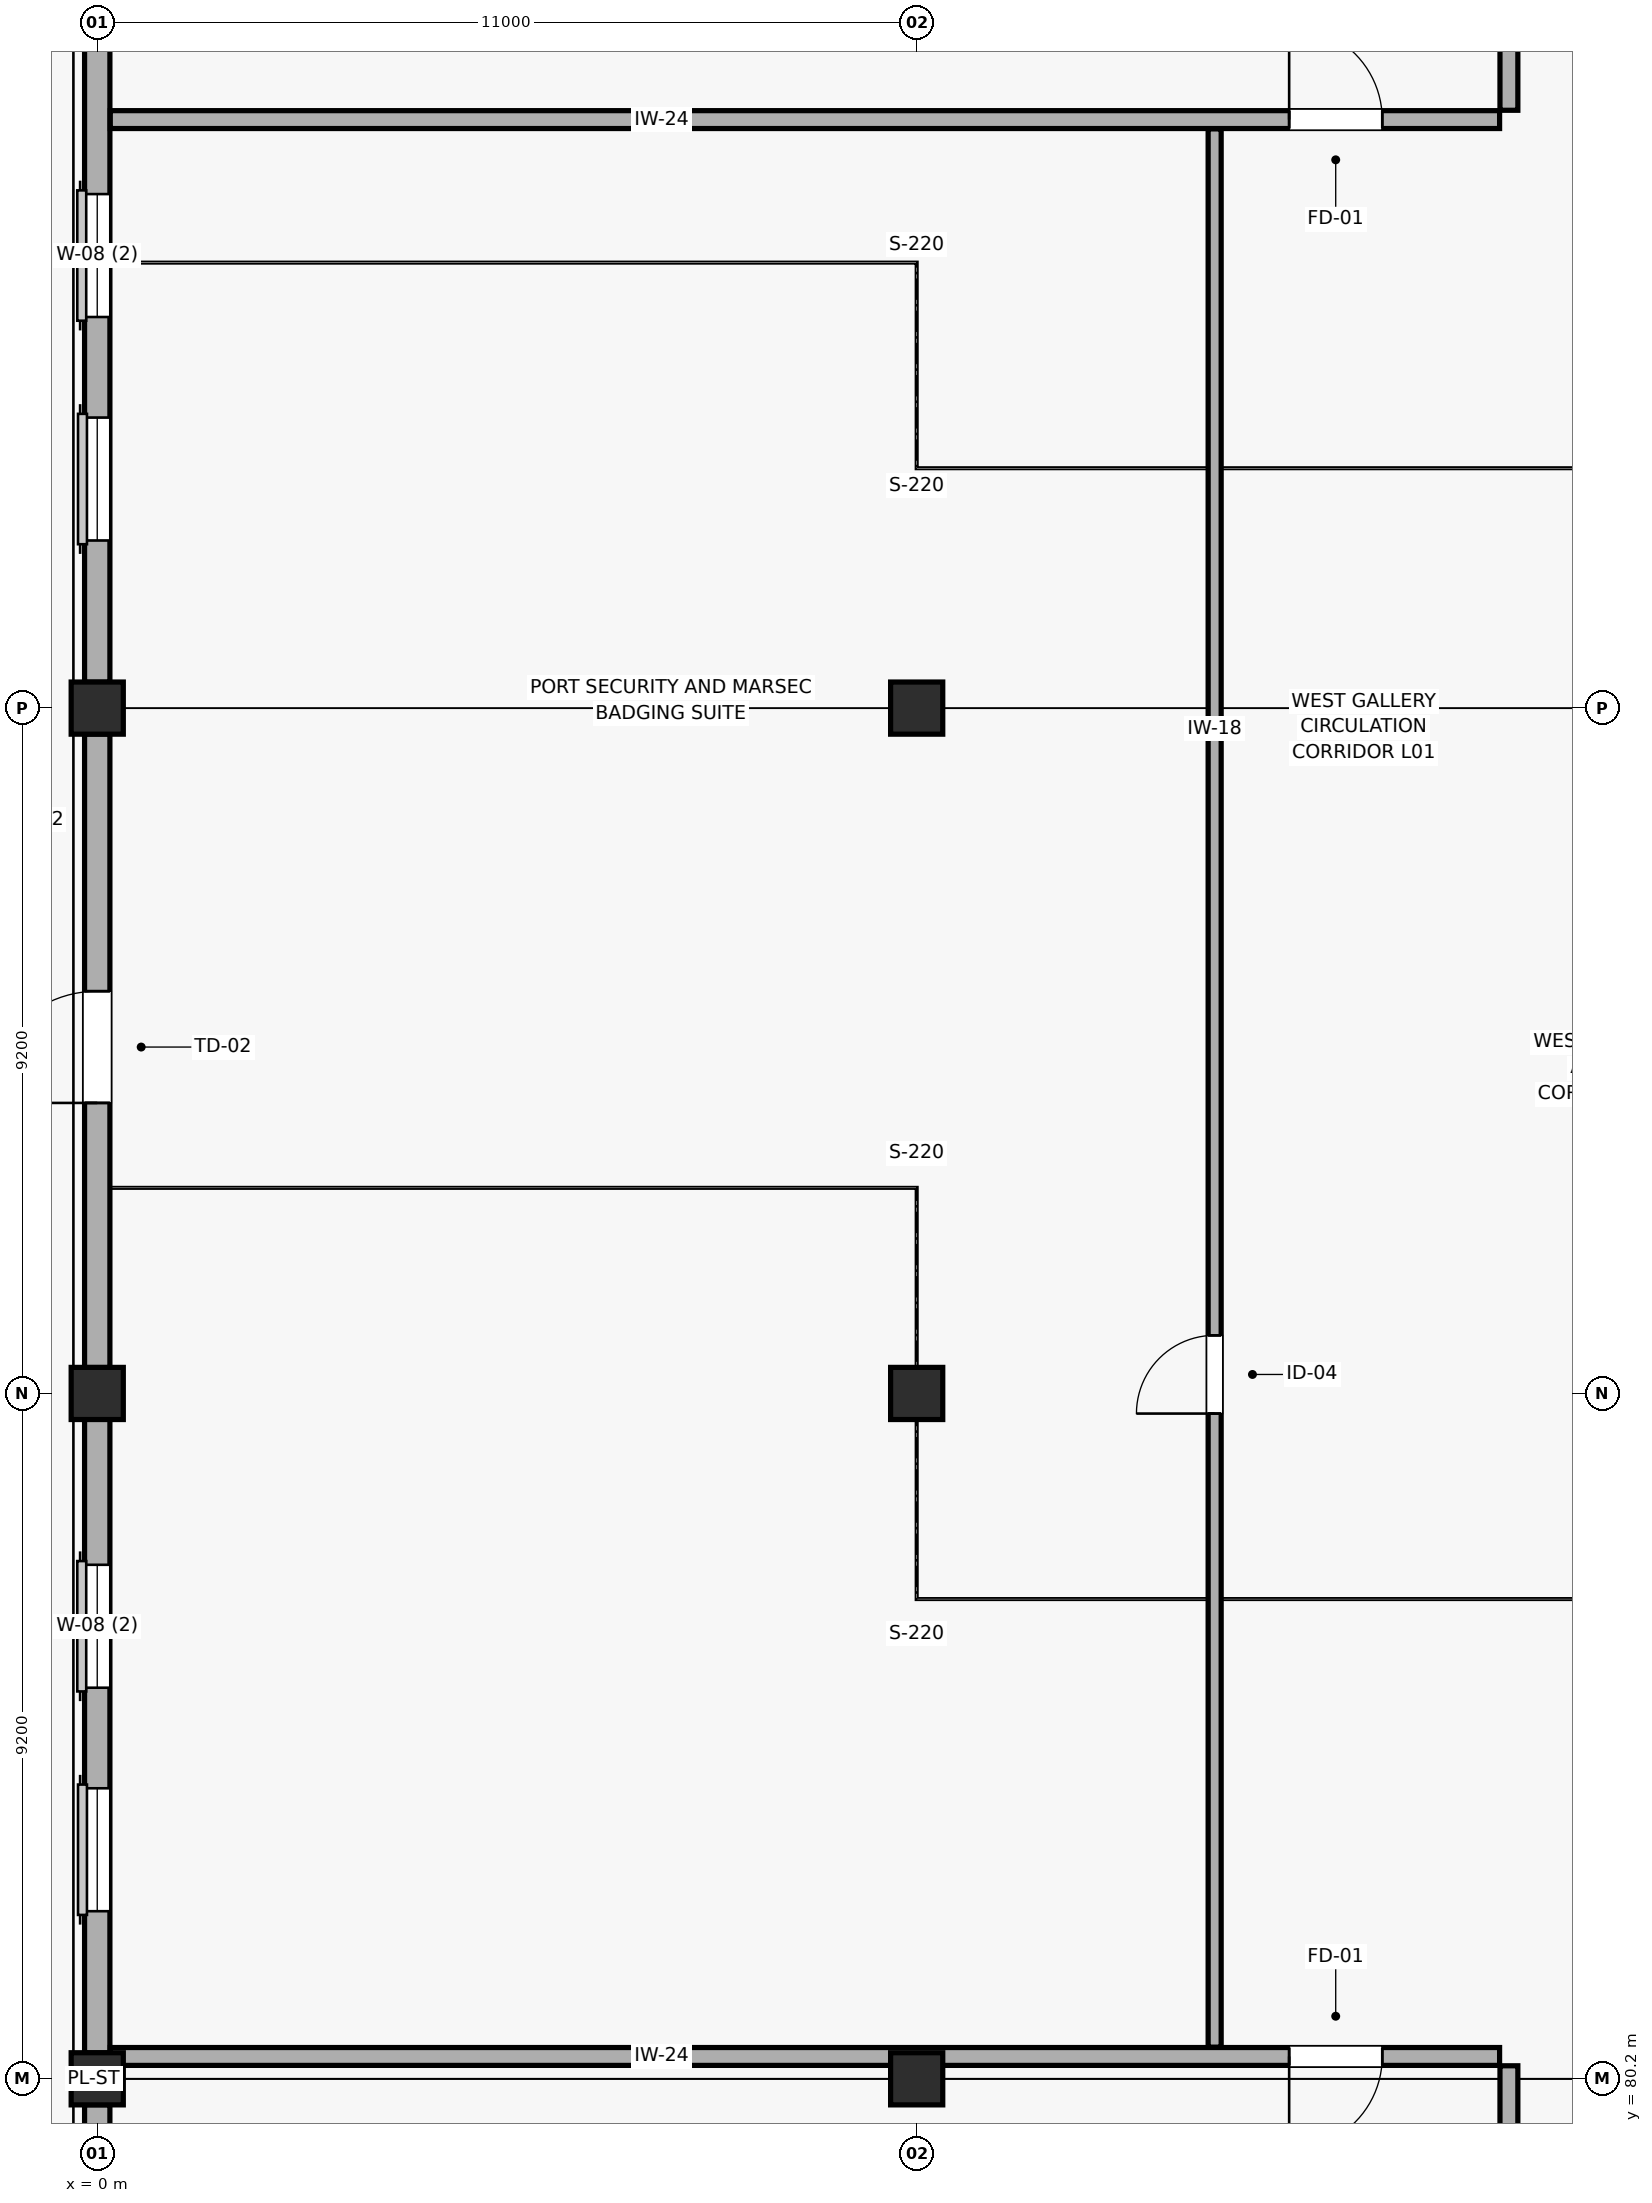
"""IFC4 building model, lengths in metres.
Left out: names, types, materials, properties, quantities, classifications, styles, units other than length and angle.
Written with IfcOpenShell. Run it as: python <this file> out.ifc"""

import sys

from ifc_helpers import new_model, si_unit, direction, frame, frame_2d, origin, origin_2d, place, context, subcontext, project, spatial, rectangle, extrude, element, fill, save


model = new_model("IFC4")
c1 = context("Model", 3, precision=1e-05, world=origin(), true_north=direction((0.0, 1.0)))
c2 = subcontext(c1, "Body", "Model", "MODEL_VIEW")
j1 = project(units=[si_unit("LENGTHUNIT", "METRE"), si_unit("PLANEANGLEUNIT", "RADIAN")], contexts=[c1])
p1 = place(None, origin())
s1 = spatial("IfcSite", under=j1, at=p1, CompositionType="ELEMENT")
p2 = place(p1, origin())
s2 = spatial("IfcBuilding", under=s1, at=p2, CompositionType="ELEMENT")
p3 = place(p2, frame((0.0, 0.0, 5.4)))
s3 = spatial("IfcBuildingStorey", under=s2, at=p3, CompositionType="ELEMENT", Elevation=5.4)
for number, where, z_axis, x_axis in (
    (1, (0.0, 80.2, 0.0), (0.0, 0.0, 1.0), (1.0, 0.0, 0.0)),
    (2, (0.0, 89.4, 0.0), (0.0, 0.0, 1.0), (1.0, 0.0, 0.0)),
    (3, (0.0, 98.6, 0.0), (0.0, 0.0, 1.0), (1.0, 0.0, 0.0)),
    (4, (11.0, 80.2, 0.0), (0.0, 0.0, 1.0), (1.0, 0.0, 0.0)),
    (5, (11.0, 89.4, 0.0), (0.0, 0.0, 1.0), (1.0, 0.0, 0.0)),
    (6, (11.0, 98.6, 0.0), (0.0, 0.0, 1.0), (1.0, 0.0, 0.0)),
):
    element("IfcColumn", number, at=place(p3, frame(where, z_axis=z_axis, x_axis=x_axis)), inside=s3, PredefinedType="COLUMN", context=c2, shape_type="SweptSolid", body=[
        extrude(rectangle(XDim=0.7, YDim=0.7, at=origin_2d()), origin(), (0.0, 0.0, 1.0), 4.5),
    ])
p4 = place(p3, frame((0.0, 79.852, 0.0), z_axis=(0.0, 0.0, 1.0), x_axis=(0.0, -1.0, 0.0)))
e7 = element("IfcWall", 7, at=p4, inside=s3, PredefinedType="SOLIDWALL", context=c2, shape_type="SweptSolid", body=[
    extrude(rectangle(XDim=7.904, YDim=0.34, at=frame_2d((3.952, 0.0))), origin(), (0.0, 0.0, 1.0), 3.725),
])
p5 = place(p4, frame((1.952, 0.0, 0.95)))
e8 = element("IfcOpeningElement", 8, at=p5, cuts=e7, PredefinedType="OPENING", context=c2, shape_type="SweptSolid", body=[
    extrude(rectangle(XDim=1.5, YDim=2.25, at=frame_2d((0.75, 1.125))), frame((0.0, 0.18, 0.0), z_axis=(0.0, -1.0, 0.0), x_axis=(1.0, 0.0, 0.0)), (0.0, 0.0, 1.0), 0.36),
])
p6 = place(p4, frame((4.952, 0.0, 0.95)))
e9 = element("IfcOpeningElement", 9, at=p6, cuts=e7, PredefinedType="OPENING", context=c2, shape_type="SweptSolid", body=[
    extrude(rectangle(XDim=1.5, YDim=2.25, at=frame_2d((0.75, 1.125))), frame((0.0, 0.18, 0.0), z_axis=(0.0, -1.0, 0.0), x_axis=(1.0, 0.0, 0.0)), (0.0, 0.0, 1.0), 0.36),
])
p7 = place(p3, frame((0.0, 89.052, 0.0), z_axis=(0.0, 0.0, 1.0), x_axis=(0.0, -1.0, 0.0)))
e10 = element("IfcWall", 10, at=p7, inside=s3, PredefinedType="SOLIDWALL", context=c2, shape_type="SweptSolid", body=[
    extrude(rectangle(XDim=8.504, YDim=0.34, at=frame_2d((4.252, 0.0))), origin(), (0.0, 0.0, 1.0), 3.725),
])
p8 = place(p7, frame((1.952, 0.0, 0.95)))
e11 = element("IfcOpeningElement", 11, at=p8, cuts=e10, PredefinedType="OPENING", context=c2, shape_type="SweptSolid", body=[
    extrude(rectangle(XDim=1.65, YDim=2.25, at=frame_2d((0.825, 1.125))), frame((0.0, 0.18, 0.0), z_axis=(0.0, -1.0, 0.0), x_axis=(1.0, 0.0, 0.0)), (0.0, 0.0, 1.0), 0.36),
])
p9 = place(p7, frame((4.952, 0.0, 0.95)))
e12 = element("IfcOpeningElement", 12, at=p9, cuts=e10, PredefinedType="OPENING", context=c2, shape_type="SweptSolid", body=[
    extrude(rectangle(XDim=1.65, YDim=2.25, at=frame_2d((0.825, 1.125))), frame((0.0, 0.18, 0.0), z_axis=(0.0, -1.0, 0.0), x_axis=(1.0, 0.0, 0.0)), (0.0, 0.0, 1.0), 0.36),
])
p10 = place(p3, frame((0.0, 98.252, 0.0), z_axis=(0.0, 0.0, 1.0), x_axis=(0.0, -1.0, 0.0)))
e13 = element("IfcWall", 13, at=p10, inside=s3, PredefinedType="SOLIDWALL", context=c2, shape_type="SweptSolid", body=[
    extrude(rectangle(XDim=8.504, YDim=0.34, at=frame_2d((4.252, 0.0))), origin(), (0.0, 0.0, 1.0), 3.725),
])
p11 = place(p10, frame((3.452, 0.0, 0.0)))
e14 = element("IfcOpeningElement", 14, at=p11, cuts=e13, PredefinedType="OPENING", context=c2, shape_type="SweptSolid", body=[
    extrude(rectangle(XDim=1.5, YDim=2.25, at=frame_2d((0.75, 1.125))), frame((0.0, 0.18, 0.0), z_axis=(0.0, -1.0, 0.0), x_axis=(1.0, 0.0, 0.0)), (0.0, 0.0, 1.0), 0.36),
])
p12 = place(p3, frame((0.0, 107.452, 0.0), z_axis=(0.0, 0.0, 1.0), x_axis=(0.0, -1.0, 0.0)))
e15 = element("IfcWall", 15, at=p12, inside=s3, PredefinedType="SOLIDWALL", context=c2, shape_type="SweptSolid", body=[
    extrude(rectangle(XDim=8.504, YDim=0.34, at=frame_2d((4.252, 0.0))), origin(), (0.0, 0.0, 1.0), 3.725),
])
p13 = place(p12, frame((1.952, 0.0, 0.95)))
e16 = element("IfcOpeningElement", 16, at=p13, cuts=e15, PredefinedType="OPENING", context=c2, shape_type="SweptSolid", body=[
    extrude(rectangle(XDim=1.65, YDim=2.25, at=frame_2d((0.825, 1.125))), frame((0.0, 0.18, 0.0), z_axis=(0.0, -1.0, 0.0), x_axis=(1.0, 0.0, 0.0)), (0.0, 0.0, 1.0), 0.36),
])
p14 = place(p12, frame((4.952, 0.0, 0.95)))
e17 = element("IfcOpeningElement", 17, at=p14, cuts=e15, PredefinedType="OPENING", context=c2, shape_type="SweptSolid", body=[
    extrude(rectangle(XDim=1.65, YDim=2.25, at=frame_2d((0.825, 1.125))), frame((0.0, 0.18, 0.0), z_axis=(0.0, -1.0, 0.0), x_axis=(1.0, 0.0, 0.0)), (0.0, 0.0, 1.0), 0.36),
])
p15 = place(p3, frame((0.175, 106.5, 0.0), z_axis=(0.0, 0.0, 1.0), x_axis=(1.0, 0.0, 0.0)))
e18 = element("IfcWall", 18, at=p15, inside=s3, PredefinedType="PARTITIONING", context=c2, shape_type="SweptSolid", body=[
    extrude(rectangle(XDim=18.65, YDim=0.24, at=frame_2d((9.325, 0.0))), origin(), (0.0, 0.0, 1.0), 3.725),
])
p16 = place(p15, frame((15.825, 0.0, 0.0)))
e19 = element("IfcOpeningElement", 19, at=p16, cuts=e18, PredefinedType="OPENING", context=c2, shape_type="SweptSolid", body=[
    extrude(rectangle(XDim=1.25, YDim=2.2, at=frame_2d((0.625, 1.1))), frame((0.0, 0.13, 0.0), z_axis=(0.0, -1.0, 0.0), x_axis=(1.0, 0.0, 0.0)), (0.0, 0.0, 1.0), 0.26),
])
p17 = place(p3, frame((0.175, 80.5, 0.0), z_axis=(0.0, 0.0, 1.0), x_axis=(1.0, 0.0, 0.0)))
e20 = element("IfcWall", 20, at=p17, inside=s3, PredefinedType="PARTITIONING", context=c2, shape_type="SweptSolid", body=[
    extrude(rectangle(XDim=18.65, YDim=0.24, at=frame_2d((9.325, 0.0))), origin(), (0.0, 0.0, 1.0), 3.625),
])
p18 = place(p17, frame((15.825, 0.0, 0.0)))
e21 = element("IfcOpeningElement", 21, at=p18, cuts=e20, PredefinedType="OPENING", context=c2, shape_type="SweptSolid", body=[
    extrude(rectangle(XDim=1.25, YDim=2.2, at=frame_2d((0.625, 1.1))), frame((0.0, 0.13, 0.0), z_axis=(0.0, -1.0, 0.0), x_axis=(1.0, 0.0, 0.0)), (0.0, 0.0, 1.0), 0.26),
])
p19 = place(p3, frame((15.0, 80.625, 0.0), z_axis=(0.0, 0.0, 1.0), x_axis=(0.0, 1.0, 0.0)))
e22 = element("IfcWall", 22, at=p19, inside=s3, PredefinedType="PARTITIONING", context=c2, shape_type="SweptSolid", body=[
    extrude(rectangle(XDim=25.75, YDim=0.175, at=frame_2d((12.875, 0.0))), origin(), (0.0, 0.0, 1.0), 3.625),
])
p20 = place(p19, frame((8.505, 0.0, 0.0)))
e23 = element("IfcOpeningElement", 23, at=p20, cuts=e22, PredefinedType="OPENING", context=c2, shape_type="SweptSolid", body=[
    extrude(rectangle(XDim=1.05, YDim=2.2, at=frame_2d((0.525, 1.1))), frame((0.0, 0.097, 0.0), z_axis=(0.0, -1.0, 0.0), x_axis=(1.0, 0.0, 0.0)), (0.0, 0.0, 1.0), 0.195),
])
p21 = place(p3, frame((18.95, 106.625, 0.0), z_axis=(0.0, 0.0, 1.0), x_axis=(0.0, 1.0, 0.0)))
e24 = element("IfcWall", 24, at=p21, inside=s3, PredefinedType="PARTITIONING", context=c2, shape_type="SweptSolid", body=[
    extrude(rectangle(XDim=3.525, YDim=0.24, at=frame_2d((1.762, 0.0))), origin(), (0.0, 0.0, 1.0), 3.625),
])
p22 = place(p21, frame((1.055, 0.0, 0.0)))
e25 = element("IfcOpeningElement", 25, at=p22, cuts=e24, PredefinedType="OPENING", context=c2, shape_type="SweptSolid", body=[
    extrude(rectangle(XDim=1.25, YDim=2.2, at=frame_2d((0.625, 1.1))), frame((0.0, 0.13, 0.0), z_axis=(0.0, -1.0, 0.0), x_axis=(1.0, 0.0, 0.0)), (0.0, 0.0, 1.0), 0.26),
])
p23 = place(p3, frame((18.95, 76.85, 0.0), z_axis=(0.0, 0.0, 1.0), x_axis=(0.0, 1.0, 0.0)))
e26 = element("IfcWall", 26, at=p23, inside=s3, PredefinedType="PARTITIONING", context=c2, shape_type="SweptSolid", body=[
    extrude(rectangle(XDim=3.525, YDim=0.24, at=frame_2d((1.762, 0.0))), origin(), (0.0, 0.0, 1.0), 3.625),
])
p24 = place(p23, frame((1.05, 0.0, 0.0)))
e27 = element("IfcOpeningElement", 27, at=p24, cuts=e26, PredefinedType="OPENING", context=c2, shape_type="SweptSolid", body=[
    extrude(rectangle(XDim=1.25, YDim=2.2, at=frame_2d((0.625, 1.1))), frame((0.0, 0.13, 0.0), z_axis=(0.0, -1.0, 0.0), x_axis=(1.0, 0.0, 0.0)), (0.0, 0.0, 1.0), 0.26),
])
p25 = place(p8, origin())
e28 = element("IfcWindow", 28, at=p25, inside=s3, PartitioningType="SINGLE_PANEL", PredefinedType="WINDOW", context=c2, shape_type="SweptSolid", body=[
    extrude(rectangle(XDim=1.65, YDim=2.25, at=frame_2d((0.825, 1.125))), frame((0.0, 0.03, 0.0), z_axis=(0.0, -1.0, 0.0), x_axis=(1.0, 0.0, 0.0)), (0.0, 0.0, 1.0), 0.06),
])
fill(e11, e28)
p26 = place(p9, origin())
e29 = element("IfcWindow", 29, at=p26, inside=s3, PartitioningType="SINGLE_PANEL", PredefinedType="WINDOW", context=c2, shape_type="SweptSolid", body=[
    extrude(rectangle(XDim=1.65, YDim=2.25, at=frame_2d((0.825, 1.125))), frame((0.0, 0.03, 0.0), z_axis=(0.0, -1.0, 0.0), x_axis=(1.0, 0.0, 0.0)), (0.0, 0.0, 1.0), 0.06),
])
fill(e12, e29)
p27 = place(p11, frame((1.5, 0.0, 0.0), z_axis=(0.0, 0.0, 1.0), x_axis=(-1.0, 0.0, 0.0)))
e30 = element("IfcDoor", 30, at=p27, inside=s3, OperationType="SINGLE_SWING_LEFT", PredefinedType="DOOR", context=c2, shape_type="SweptSolid", body=[
    extrude(rectangle(XDim=1.5, YDim=2.25, at=frame_2d((0.75, 1.125))), frame((0.0, 0.025, 0.0), z_axis=(0.0, -1.0, 0.0), x_axis=(1.0, 0.0, 0.0)), (0.0, 0.0, 1.0), 0.05),
])
fill(e14, e30)
p28 = place(p13, origin())
e31 = element("IfcWindow", 31, at=p28, inside=s3, PartitioningType="SINGLE_PANEL", PredefinedType="WINDOW", context=c2, shape_type="SweptSolid", body=[
    extrude(rectangle(XDim=1.65, YDim=2.25, at=frame_2d((0.825, 1.125))), frame((0.0, 0.03, 0.0), z_axis=(0.0, -1.0, 0.0), x_axis=(1.0, 0.0, 0.0)), (0.0, 0.0, 1.0), 0.06),
])
fill(e16, e31)
p29 = place(p14, origin())
e32 = element("IfcWindow", 32, at=p29, inside=s3, PartitioningType="SINGLE_PANEL", PredefinedType="WINDOW", context=c2, shape_type="SweptSolid", body=[
    extrude(rectangle(XDim=1.65, YDim=2.25, at=frame_2d((0.825, 1.125))), frame((0.0, 0.03, 0.0), z_axis=(0.0, -1.0, 0.0), x_axis=(1.0, 0.0, 0.0)), (0.0, 0.0, 1.0), 0.06),
])
fill(e17, e32)
p30 = place(p16, origin())
e33 = element("IfcDoor", 33, at=p30, inside=s3, OperationType="SINGLE_SWING_LEFT", PredefinedType="DOOR", context=c2, shape_type="SweptSolid", body=[
    extrude(rectangle(XDim=1.25, YDim=2.2, at=frame_2d((0.625, 1.1))), frame((0.0, 0.025, 0.0), z_axis=(0.0, -1.0, 0.0), x_axis=(1.0, 0.0, 0.0)), (0.0, 0.0, 1.0), 0.05),
])
fill(e19, e33)
p31 = place(p18, frame((1.25, 0.0, 0.0), z_axis=(0.0, 0.0, 1.0), x_axis=(-1.0, 0.0, 0.0)))
e34 = element("IfcDoor", 34, at=p31, inside=s3, OperationType="SINGLE_SWING_RIGHT", PredefinedType="DOOR", context=c2, shape_type="SweptSolid", body=[
    extrude(rectangle(XDim=1.25, YDim=2.2, at=frame_2d((0.625, 1.1))), frame((0.0, 0.025, 0.0), z_axis=(0.0, -1.0, 0.0), x_axis=(1.0, 0.0, 0.0)), (0.0, 0.0, 1.0), 0.05),
])
fill(e21, e34)
p32 = place(p20, origin())
e35 = element("IfcDoor", 35, at=p32, inside=s3, OperationType="SINGLE_SWING_LEFT", PredefinedType="DOOR", context=c2, shape_type="SweptSolid", body=[
    extrude(rectangle(XDim=1.05, YDim=2.2, at=frame_2d((0.525, 1.1))), frame((0.0, 0.025, 0.0), z_axis=(0.0, -1.0, 0.0), x_axis=(1.0, 0.0, 0.0)), (0.0, 0.0, 1.0), 0.05),
])
fill(e23, e35)
save(model, sys.argv[1])
